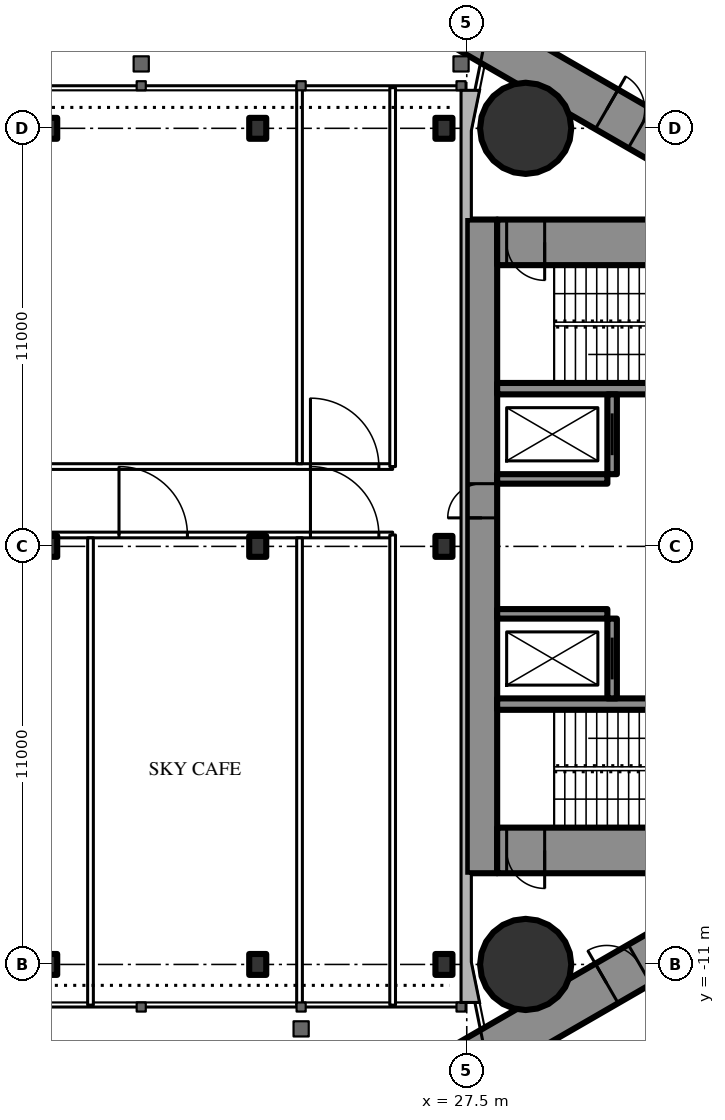
"""IFC4 building model, lengths in metres.
Left out: names, types, materials, properties, quantities, classifications, styles, units other than length and angle.
Written with IfcOpenShell. Run it as: python <this file> out.ifc"""

import sys

from ifc_helpers import new_model, si_unit, direction, frame, frame_2d, origin, origin_2d, place, context, subcontext, project, spatial, rectangle, circle, i_section, extrude, element, fill, save


model = new_model("IFC4")
c1 = context("Model", 3, precision=1e-05, world=origin(), true_north=direction((0.0, 1.0)))
c2 = subcontext(c1, "Body", "Model", "MODEL_VIEW")
j1 = project(units=[si_unit("LENGTHUNIT", "METRE"), si_unit("PLANEANGLEUNIT", "RADIAN")], contexts=[c1])
p1 = place(None, origin())
s1 = spatial("IfcSite", under=j1, at=p1, CompositionType="ELEMENT")
p2 = place(p1, origin())
s2 = spatial("IfcBuilding", under=s1, at=p2, CompositionType="ELEMENT")
p3 = place(p2, frame((0.0, 0.0, 257.3)))
s3 = spatial("IfcBuildingStorey", under=s2, at=p3, CompositionType="ELEMENT", Elevation=257.3)
for number, where, z_axis, x_axis in (
    (1, (29.05, 11.0, 0.0), (0.0, 0.0, 1.0), (1.0, 0.0, 0.0)),
    (2, (29.05, -11.0, 0.0), (0.0, 0.0, 1.0), (1.0, 0.0, 0.0)),
):
    element("IfcColumn", number, at=place(p3, frame(where, z_axis=z_axis, x_axis=x_axis)), inside=s3, PredefinedType="COLUMN", context=c2, shape_type="SweptSolid", body=[
        extrude(circle(Radius=1.2, at=origin_2d()), origin(), (0.0, 0.0, 1.0), 6.0),
    ])
p4 = place(p3, frame((27.9, -8.6, 0.0), z_axis=(0.0, 0.0, 1.0), x_axis=(0.0, 1.0, 0.0)))
e3 = element("IfcWall", 3, at=p4, inside=s3, PredefinedType="SHEAR", context=c2, shape_type="SweptSolid", body=[
    extrude(rectangle(XDim=17.2, YDim=0.8, at=frame_2d((8.6, 0.0))), origin(), (0.0, 0.0, 1.0), 6.0),
])
p5 = place(p4, frame((9.35, 0.0, 0.0)))
e4 = element("IfcOpeningElement", 4, at=p5, cuts=e3, PredefinedType="OPENING", context=c2, shape_type="SweptSolid", body=[
    extrude(rectangle(XDim=0.9, YDim=2.2, at=frame_2d((0.45, 1.1))), frame((0.0, 0.41, 0.0), z_axis=(0.0, -1.0, 0.0), x_axis=(1.0, 0.0, 0.0)), (0.0, 0.0, 1.0), 0.82),
])
p6 = place(p3, frame((28.3, -8.0, 0.0), z_axis=(0.0, 0.0, 1.0), x_axis=(1.0, 0.0, 0.0)))
e5 = element("IfcWall", 5, at=p6, inside=s3, PredefinedType="SHEAR", context=c2, shape_type="SweptSolid", body=[
    extrude(rectangle(XDim=8.4, YDim=1.2, at=frame_2d((4.2, 0.0))), origin(), (0.0, 0.0, 1.0), 6.0),
])
p7 = place(p6, frame((0.25, 0.0, 0.0)))
e6 = element("IfcOpeningElement", 6, at=p7, cuts=e5, PredefinedType="OPENING", context=c2, shape_type="SweptSolid", body=[
    extrude(rectangle(XDim=1.0, YDim=2.2, at=frame_2d((0.5, 1.1))), frame((0.0, 0.61, 0.0), z_axis=(0.0, -1.0, 0.0), x_axis=(1.0, 0.0, 0.0)), (0.0, 0.0, 1.0), 1.22),
])
p8 = place(p3, frame((28.3, 8.0, 0.0), z_axis=(0.0, 0.0, 1.0), x_axis=(1.0, 0.0, 0.0)))
e7 = element("IfcWall", 7, at=p8, inside=s3, PredefinedType="SHEAR", context=c2, shape_type="SweptSolid", body=[
    extrude(rectangle(XDim=8.4, YDim=1.2, at=frame_2d((4.2, 0.0))), origin(), (0.0, 0.0, 1.0), 6.0),
])
p9 = place(p8, frame((0.25, 0.0, 0.0)))
e8 = element("IfcOpeningElement", 8, at=p9, cuts=e7, PredefinedType="OPENING", context=c2, shape_type="SweptSolid", body=[
    extrude(rectangle(XDim=1.0, YDim=2.2, at=frame_2d((0.5, 1.1))), frame((0.0, 0.61, 0.0), z_axis=(0.0, -1.0, 0.0), x_axis=(1.0, 0.0, 0.0)), (0.0, 0.0, 1.0), 1.22),
])
for number, where, z_axis, x_axis in (
    (9, (28.3, -4.15, 0.0), (0.0, 0.0, 1.0), (1.0, 0.0, 0.0)),
    (10, (28.3, 4.15, 0.0), (0.0, 0.0, 1.0), (1.0, 0.0, 0.0)),
):
    element("IfcWall", number, at=place(p3, frame(where, z_axis=z_axis, x_axis=x_axis)), inside=s3, PredefinedType="SHEAR", context=c2, shape_type="SweptSolid", body=[
        extrude(rectangle(XDim=8.4, YDim=0.3, at=frame_2d((4.2, 0.0))), origin(), (0.0, 0.0, 1.0), 6.0),
    ])
p10 = place(p3, frame((31.325, -4.0, 0.0), z_axis=(0.0, 0.0, 1.0), x_axis=(0.0, 1.0, 0.0)))
e11 = element("IfcWall", 11, at=p10, inside=s3, PredefinedType="SHEAR", context=c2, shape_type="SweptSolid", body=[
    extrude(rectangle(XDim=2.1, YDim=0.25, at=frame_2d((1.05, 0.0))), origin(), (0.0, 0.0, 1.0), 6.0),
])
p11 = place(p10, frame((0.5, 0.0, 0.0)))
e12 = element("IfcOpeningElement", 12, at=p11, cuts=e11, PredefinedType="OPENING", context=c2, shape_type="SweptSolid", body=[
    extrude(rectangle(XDim=1.1, YDim=2.2, at=frame_2d((0.55, 1.1))), frame((0.0, 0.135, 0.0), z_axis=(0.0, -1.0, 0.0), x_axis=(1.0, 0.0, 0.0)), (0.0, 0.0, 1.0), 0.27),
])
p12 = place(p3, frame((28.3, -1.775, 0.0), z_axis=(0.0, 0.0, 1.0), x_axis=(1.0, 0.0, 0.0)))
e13 = element("IfcWall", 13, at=p12, inside=s3, PredefinedType="SHEAR", context=c2, shape_type="SweptSolid", body=[
    extrude(rectangle(XDim=2.9, YDim=0.25, at=frame_2d((1.45, 0.0))), origin(), (0.0, 0.0, 1.0), 6.0),
])
p13 = place(p3, frame((31.325, 1.9, 0.0), z_axis=(0.0, 0.0, 1.0), x_axis=(0.0, 1.0, 0.0)))
e14 = element("IfcWall", 14, at=p13, inside=s3, PredefinedType="SHEAR", context=c2, shape_type="SweptSolid", body=[
    extrude(rectangle(XDim=2.1, YDim=0.25, at=frame_2d((1.05, 0.0))), origin(), (0.0, 0.0, 1.0), 6.0),
])
p14 = place(p13, frame((0.5, 0.0, 0.0)))
e15 = element("IfcOpeningElement", 15, at=p14, cuts=e14, PredefinedType="OPENING", context=c2, shape_type="SweptSolid", body=[
    extrude(rectangle(XDim=1.1, YDim=2.2, at=frame_2d((0.55, 1.1))), frame((0.0, 0.135, 0.0), z_axis=(0.0, -1.0, 0.0), x_axis=(1.0, 0.0, 0.0)), (0.0, 0.0, 1.0), 0.27),
])
p15 = place(p3, frame((28.3, 1.775, 0.0), z_axis=(0.0, 0.0, 1.0), x_axis=(1.0, 0.0, 0.0)))
e16 = element("IfcWall", 16, at=p15, inside=s3, PredefinedType="SHEAR", context=c2, shape_type="SweptSolid", body=[
    extrude(rectangle(XDim=2.9, YDim=0.25, at=frame_2d((1.45, 0.0))), origin(), (0.0, 0.0, 1.0), 6.0),
])
p16 = place(p3, frame((27.2, -13.8, 0.0), z_axis=(0.0, 0.0, 1.0), x_axis=(0.866027159892, 0.499996958321, 0.0)))
e17 = element("IfcWall", 17, at=p16, inside=s3, PredefinedType="SHEAR", context=c2, shape_type="SweptSolid", body=[
    extrude(rectangle(XDim=27.947, YDim=1.2, at=frame_2d((13.973, 0.0))), origin(), (0.0, 0.0, 1.0), 6.0),
])
p17 = place(p16, frame((4.6, 0.0, 0.0)))
e18 = element("IfcOpeningElement", 18, at=p17, cuts=e17, PredefinedType="OPENING", context=c2, shape_type="SweptSolid", body=[
    extrude(rectangle(XDim=1.0, YDim=2.2, at=frame_2d((0.5, 1.1))), frame((0.0, 0.61, 0.0), z_axis=(0.0, -1.0, 0.0), x_axis=(1.0, 0.0, 0.0)), (0.0, 0.0, 1.0), 1.22),
])
p18 = place(p16, frame((13.395, 0.0, 0.0)))
e19 = element("IfcOpeningElement", 19, at=p18, cuts=e17, PredefinedType="OPENING", context=c2, shape_type="SweptSolid", body=[
    extrude(rectangle(XDim=1.8, YDim=2.2, at=frame_2d((0.9, 1.1))), frame((0.0, 0.61, 0.0), z_axis=(0.0, -1.0, 0.0), x_axis=(1.0, 0.0, 0.0)), (0.0, 0.0, 1.0), 1.22),
])
p19 = place(p3, frame((27.2, 13.8, 0.0), z_axis=(0.0, 0.0, 1.0), x_axis=(0.866024515034, -0.500001539357, 0.0)))
e20 = element("IfcWall", 20, at=p19, inside=s3, PredefinedType="SHEAR", context=c2, shape_type="SweptSolid", body=[
    extrude(rectangle(XDim=26.907, YDim=1.2, at=frame_2d((13.454, 0.0))), origin(), (0.0, 0.0, 1.0), 6.0),
])
p20 = place(p19, frame((4.6, 0.0, 0.0)))
e21 = element("IfcOpeningElement", 21, at=p20, cuts=e20, PredefinedType="OPENING", context=c2, shape_type="SweptSolid", body=[
    extrude(rectangle(XDim=1.0, YDim=2.2, at=frame_2d((0.5, 1.1))), frame((0.0, 0.61, 0.0), z_axis=(0.0, -1.0, 0.0), x_axis=(1.0, 0.0, 0.0)), (0.0, 0.0, 1.0), 1.22),
])
p21 = place(p19, frame((13.395, 0.0, 0.0)))
e22 = element("IfcOpeningElement", 22, at=p21, cuts=e20, PredefinedType="OPENING", context=c2, shape_type="SweptSolid", body=[
    extrude(rectangle(XDim=1.8, YDim=2.2, at=frame_2d((0.9, 1.1))), frame((0.0, 0.61, 0.0), z_axis=(0.0, -1.0, 0.0), x_axis=(1.0, 0.0, 0.0)), (0.0, 0.0, 1.0), 1.22),
])
for number, where, z_axis, x_axis in (
    (23, (16.5, -11.0, 0.0), (0.0, 0.0, 1.0), (1.0, 0.0, 0.0)),
    (24, (22.0, -11.0, 0.0), (0.0, 0.0, 1.0), (1.0, 0.0, 0.0)),
    (25, (26.9, -11.0, 0.0), (0.0, 0.0, 1.0), (1.0, 0.0, 0.0)),
    (26, (16.5, 0.0, 0.0), (0.0, 0.0, 1.0), (1.0, 0.0, 0.0)),
    (27, (22.0, 0.0, 0.0), (0.0, 0.0, 1.0), (1.0, 0.0, 0.0)),
    (28, (26.9, 0.0, 0.0), (0.0, 0.0, 1.0), (1.0, 0.0, 0.0)),
    (29, (16.5, 11.0, 0.0), (0.0, 0.0, 1.0), (1.0, 0.0, 0.0)),
    (30, (22.0, 11.0, 0.0), (0.0, 0.0, 1.0), (1.0, 0.0, 0.0)),
    (31, (26.9, 11.0, 0.0), (0.0, 0.0, 1.0), (1.0, 0.0, 0.0)),
):
    element("IfcColumn", number, at=place(p3, frame(where, z_axis=z_axis, x_axis=x_axis)), inside=s3, PredefinedType="COLUMN", context=c2, shape_type="SweptSolid", body=[
        extrude(i_section(OverallWidth=0.448, OverallDepth=0.55, WebThickness=0.072, FlangeThickness=0.115, FilletRadius=0.02, at=origin_2d()), origin(), (0.0, 0.0, 1.0), 6.0),
    ])
p22 = place(p3, frame((28.907, -15.47, 0.0), z_axis=(0.0, 0.0, 1.0), x_axis=(0.866023700353, 0.500002950419, 0.0)))
e32 = element("IfcWall", 32, at=p22, inside=s3, PredefinedType="PARTITIONING", context=c2, shape_type="SweptSolid", body=[
    extrude(rectangle(XDim=30.941, YDim=0.2, at=frame_2d((15.47, 0.0))), origin(), (0.0, 0.0, 1.0), 5.75),
])
p23 = place(p22, frame((7.024, 0.0, 0.0)))
e33 = element("IfcOpeningElement", 33, at=p23, cuts=e32, PredefinedType="OPENING", context=c2, shape_type="SweptSolid", body=[
    extrude(rectangle(XDim=2.0, YDim=2.4, at=frame_2d((1.0, 1.2))), frame((0.0, 0.11, 0.0), z_axis=(0.0, -1.0, 0.0), x_axis=(1.0, 0.0, 0.0)), (0.0, 0.0, 1.0), 0.22),
])
p24 = place(p22, frame((16.865, 0.0, 0.0)))
e34 = element("IfcOpeningElement", 34, at=p24, cuts=e32, PredefinedType="OPENING", context=c2, shape_type="SweptSolid", body=[
    extrude(rectangle(XDim=1.8, YDim=2.2, at=frame_2d((0.9, 1.1))), frame((0.0, 0.11, 0.0), z_axis=(0.0, -1.0, 0.0), x_axis=(1.0, 0.0, 0.0)), (0.0, 0.0, 1.0), 0.22),
])
p25 = place(p22, frame((20.748, 0.0, 0.0)))
e35 = element("IfcOpeningElement", 35, at=p25, cuts=e32, PredefinedType="OPENING", context=c2, shape_type="SweptSolid", body=[
    extrude(rectangle(XDim=1.8, YDim=2.2, at=frame_2d((0.9, 1.1))), frame((0.0, 0.11, 0.0), z_axis=(0.0, -1.0, 0.0), x_axis=(1.0, 0.0, 0.0)), (0.0, 0.0, 1.0), 0.22),
])
p26 = place(p22, frame((26.152, 0.0, 0.0)))
e36 = element("IfcOpeningElement", 36, at=p26, cuts=e32, PredefinedType="OPENING", context=c2, shape_type="SweptSolid", body=[
    extrude(rectangle(XDim=2.0, YDim=2.4, at=frame_2d((1.0, 1.2))), frame((0.0, 0.11, 0.0), z_axis=(0.0, -1.0, 0.0), x_axis=(1.0, 0.0, 0.0)), (0.0, 0.0, 1.0), 0.22),
])
p27 = place(p3, frame((28.907, 15.47, 0.0), z_axis=(0.0, 0.0, 1.0), x_axis=(0.866025841386, -0.499999242051, 0.0)))
e37 = element("IfcWall", 37, at=p27, inside=s3, PredefinedType="PARTITIONING", context=c2, shape_type="SweptSolid", body=[
    extrude(rectangle(XDim=30.821, YDim=0.2, at=frame_2d((15.41, 0.0))), origin(), (0.0, 0.0, 1.0), 5.75),
])
p28 = place(p27, frame((26.092, 0.0, 0.0)))
e38 = element("IfcOpeningElement", 38, at=p28, cuts=e37, PredefinedType="OPENING", context=c2, shape_type="SweptSolid", body=[
    extrude(rectangle(XDim=2.0, YDim=2.4, at=frame_2d((1.0, 1.2))), frame((0.0, 0.11, 0.0), z_axis=(0.0, -1.0, 0.0), x_axis=(1.0, 0.0, 0.0)), (0.0, 0.0, 1.0), 0.22),
])
p29 = place(p27, frame((20.748, 0.0, 0.0)))
e39 = element("IfcOpeningElement", 39, at=p29, cuts=e37, PredefinedType="OPENING", context=c2, shape_type="SweptSolid", body=[
    extrude(rectangle(XDim=1.8, YDim=2.2, at=frame_2d((0.9, 1.1))), frame((0.0, 0.11, 0.0), z_axis=(0.0, -1.0, 0.0), x_axis=(1.0, 0.0, 0.0)), (0.0, 0.0, 1.0), 0.22),
])
p30 = place(p27, frame((16.865, 0.0, 0.0)))
e40 = element("IfcOpeningElement", 40, at=p30, cuts=e37, PredefinedType="OPENING", context=c2, shape_type="SweptSolid", body=[
    extrude(rectangle(XDim=1.8, YDim=2.2, at=frame_2d((0.9, 1.1))), frame((0.0, 0.11, 0.0), z_axis=(0.0, -1.0, 0.0), x_axis=(1.0, 0.0, 0.0)), (0.0, 0.0, 1.0), 0.22),
])
p31 = place(p27, frame((7.024, 0.0, 0.0)))
e41 = element("IfcOpeningElement", 41, at=p31, cuts=e37, PredefinedType="OPENING", context=c2, shape_type="SweptSolid", body=[
    extrude(rectangle(XDim=2.0, YDim=2.4, at=frame_2d((1.0, 1.2))), frame((0.0, 0.11, 0.0), z_axis=(0.0, -1.0, 0.0), x_axis=(1.0, 0.0, 0.0)), (0.0, 0.0, 1.0), 0.22),
])
p32 = place(p3, frame((-25.55, 0.3, 0.0), z_axis=(0.0, 0.0, 1.0), x_axis=(1.0, 0.0, 0.0)))
e42 = element("IfcWall", 42, at=p32, inside=s3, PredefinedType="PARTITIONING", context=c2, shape_type="SweptSolid", body=[
    extrude(rectangle(XDim=51.1, YDim=0.15, at=frame_2d((25.55, 0.0))), origin(), (0.0, 0.0, 1.0), 4.8),
])
p33 = place(p32, frame((0.363, 0.0, 0.0)))
e43 = element("IfcOpeningElement", 43, at=p33, cuts=e42, PredefinedType="OPENING", context=c2, shape_type="SweptSolid", body=[
    extrude(rectangle(XDim=1.8, YDim=2.2, at=frame_2d((0.9, 1.1))), frame((0.0, 0.085, 0.0), z_axis=(0.0, -1.0, 0.0), x_axis=(1.0, 0.0, 0.0)), (0.0, 0.0, 1.0), 0.17),
])
p34 = place(p32, frame((5.4, 0.0, 0.0)))
e44 = element("IfcOpeningElement", 44, at=p34, cuts=e42, PredefinedType="OPENING", context=c2, shape_type="SweptSolid", body=[
    extrude(rectangle(XDim=1.8, YDim=2.2, at=frame_2d((0.9, 1.1))), frame((0.0, 0.085, 0.0), z_axis=(0.0, -1.0, 0.0), x_axis=(1.0, 0.0, 0.0)), (0.0, 0.0, 1.0), 0.17),
])
p35 = place(p32, frame((21.8, 0.0, 0.0)))
e45 = element("IfcOpeningElement", 45, at=p35, cuts=e42, PredefinedType="OPENING", context=c2, shape_type="SweptSolid", body=[
    extrude(rectangle(XDim=2.0, YDim=2.4, at=frame_2d((1.0, 1.2))), frame((0.0, 0.085, 0.0), z_axis=(0.0, -1.0, 0.0), x_axis=(1.0, 0.0, 0.0)), (0.0, 0.0, 1.0), 0.17),
])
p36 = place(p32, frame((43.9, 0.0, 0.0)))
e46 = element("IfcOpeningElement", 46, at=p36, cuts=e42, PredefinedType="OPENING", context=c2, shape_type="SweptSolid", body=[
    extrude(rectangle(XDim=1.8, YDim=2.2, at=frame_2d((0.9, 1.1))), frame((0.0, 0.085, 0.0), z_axis=(0.0, -1.0, 0.0), x_axis=(1.0, 0.0, 0.0)), (0.0, 0.0, 1.0), 0.17),
])
p37 = place(p32, frame((48.938, 0.0, 0.0)))
e47 = element("IfcOpeningElement", 47, at=p37, cuts=e42, PredefinedType="OPENING", context=c2, shape_type="SweptSolid", body=[
    extrude(rectangle(XDim=1.8, YDim=2.2, at=frame_2d((0.9, 1.1))), frame((0.0, 0.085, 0.0), z_axis=(0.0, -1.0, 0.0), x_axis=(1.0, 0.0, 0.0)), (0.0, 0.0, 1.0), 0.17),
])
p38 = place(p3, frame((-25.55, 2.1, 0.0), z_axis=(0.0, 0.0, 1.0), x_axis=(1.0, 0.0, 0.0)))
e48 = element("IfcWall", 48, at=p38, inside=s3, PredefinedType="PARTITIONING", context=c2, shape_type="SweptSolid", body=[
    extrude(rectangle(XDim=51.1, YDim=0.15, at=frame_2d((25.55, 0.0))), origin(), (0.0, 0.0, 1.0), 5.8),
])
p39 = place(p38, frame((0.363, 0.0, 0.0)))
e49 = element("IfcOpeningElement", 49, at=p39, cuts=e48, PredefinedType="OPENING", context=c2, shape_type="SweptSolid", body=[
    extrude(rectangle(XDim=1.8, YDim=2.2, at=frame_2d((0.9, 1.1))), frame((0.0, 0.085, 0.0), z_axis=(0.0, -1.0, 0.0), x_axis=(1.0, 0.0, 0.0)), (0.0, 0.0, 1.0), 0.17),
])
p40 = place(p38, frame((10.9, 0.0, 0.0)))
e50 = element("IfcOpeningElement", 50, at=p40, cuts=e48, PredefinedType="OPENING", context=c2, shape_type="SweptSolid", body=[
    extrude(rectangle(XDim=1.8, YDim=2.2, at=frame_2d((0.9, 1.1))), frame((0.0, 0.085, 0.0), z_axis=(0.0, -1.0, 0.0), x_axis=(1.0, 0.0, 0.0)), (0.0, 0.0, 1.0), 0.17),
])
p41 = place(p38, frame((38.3, 0.0, 0.0)))
e51 = element("IfcOpeningElement", 51, at=p41, cuts=e48, PredefinedType="OPENING", context=c2, shape_type="SweptSolid", body=[
    extrude(rectangle(XDim=2.0, YDim=2.4, at=frame_2d((1.0, 1.2))), frame((0.0, 0.085, 0.0), z_axis=(0.0, -1.0, 0.0), x_axis=(1.0, 0.0, 0.0)), (0.0, 0.0, 1.0), 0.17),
])
p42 = place(p38, frame((48.938, 0.0, 0.0)))
e52 = element("IfcOpeningElement", 52, at=p42, cuts=e48, PredefinedType="OPENING", context=c2, shape_type="SweptSolid", body=[
    extrude(rectangle(XDim=1.8, YDim=2.2, at=frame_2d((0.9, 1.1))), frame((0.0, 0.085, 0.0), z_axis=(0.0, -1.0, 0.0), x_axis=(1.0, 0.0, 0.0)), (0.0, 0.0, 1.0), 0.17),
])
p43 = place(p3, frame((25.55, -12.07, 0.0), z_axis=(0.0, 0.0, 1.0), x_axis=(0.0, 1.0, 0.0)))
e53 = element("IfcWall", 53, at=p43, inside=s3, PredefinedType="PARTITIONING", context=c2, shape_type="SweptSolid", body=[
    extrude(rectangle(XDim=12.37, YDim=0.15, at=frame_2d((6.185, 0.0))), origin(), (0.0, 0.0, 1.0), 5.8),
])
p44 = place(p3, frame((25.55, 2.1, 0.0), z_axis=(0.0, 0.0, 1.0), x_axis=(0.0, 1.0, 0.0)))
e54 = element("IfcWall", 54, at=p44, inside=s3, PredefinedType="PARTITIONING", context=c2, shape_type="SweptSolid", body=[
    extrude(rectangle(XDim=9.97, YDim=0.15, at=frame_2d((4.985, 0.0))), origin(), (0.0, 0.0, 1.0), 5.8),
])
for number, where, z_axis, x_axis in (
    (55, (17.6, -12.07, 0.0), (0.0, 0.0, 1.0), (0.0, 1.0, 0.0)),
    (56, (23.1, -12.07, 0.0), (0.0, 0.0, 1.0), (0.0, 1.0, 0.0)),
):
    element("IfcWall", number, at=place(p3, frame(where, z_axis=z_axis, x_axis=x_axis)), inside=s3, PredefinedType="PARTITIONING", context=c2, shape_type="SweptSolid", body=[
        extrude(rectangle(XDim=12.295, YDim=0.15, at=frame_2d((6.147, 0.0))), origin(), (0.0, 0.0, 1.0), 5.8),
    ])
p45 = place(p3, frame((23.1, 2.175, 0.0), z_axis=(0.0, 0.0, 1.0), x_axis=(0.0, 1.0, 0.0)))
e57 = element("IfcWall", 57, at=p45, inside=s3, PredefinedType="PARTITIONING", context=c2, shape_type="SweptSolid", body=[
    extrude(rectangle(XDim=9.895, YDim=0.15, at=frame_2d((4.948, 0.0))), origin(), (0.0, 0.0, 1.0), 5.8),
])
p46 = place(p17, origin())
e58 = element("IfcDoor", 58, at=p46, inside=s3, OperationType="SINGLE_SWING_LEFT", PredefinedType="DOOR", context=c2, shape_type="SweptSolid", body=[
    extrude(rectangle(XDim=1.0, YDim=2.2, at=frame_2d((0.5, 1.1))), frame((0.0, 0.025, 0.0), z_axis=(0.0, -1.0, 0.0), x_axis=(1.0, 0.0, 0.0)), (0.0, 0.0, 1.0), 0.05),
])
fill(e18, e58)
p47 = place(p20, origin())
e59 = element("IfcDoor", 59, at=p47, inside=s3, OperationType="SINGLE_SWING_LEFT", PredefinedType="DOOR", context=c2, shape_type="SweptSolid", body=[
    extrude(rectangle(XDim=1.0, YDim=2.2, at=frame_2d((0.5, 1.1))), frame((0.0, 0.025, 0.0), z_axis=(0.0, -1.0, 0.0), x_axis=(1.0, 0.0, 0.0)), (0.0, 0.0, 1.0), 0.05),
])
fill(e21, e59)
p48 = place(p7, origin())
e60 = element("IfcDoor", 60, at=p48, inside=s3, OperationType="SINGLE_SWING_RIGHT", PredefinedType="DOOR", context=c2, shape_type="SweptSolid", body=[
    extrude(rectangle(XDim=1.0, YDim=2.2, at=frame_2d((0.5, 1.1))), frame((0.0, 0.025, 0.0), z_axis=(0.0, -1.0, 0.0), x_axis=(1.0, 0.0, 0.0)), (0.0, 0.0, 1.0), 0.05),
])
fill(e6, e60)
p49 = place(p9, origin())
e61 = element("IfcDoor", 61, at=p49, inside=s3, OperationType="SINGLE_SWING_RIGHT", PredefinedType="DOOR", context=c2, shape_type="SweptSolid", body=[
    extrude(rectangle(XDim=1.0, YDim=2.2, at=frame_2d((0.5, 1.1))), frame((0.0, 0.025, 0.0), z_axis=(0.0, -1.0, 0.0), x_axis=(1.0, 0.0, 0.0)), (0.0, 0.0, 1.0), 0.05),
])
fill(e8, e61)
p50 = place(p5, origin())
e62 = element("IfcDoor", 62, at=p50, inside=s3, OperationType="SINGLE_SWING_LEFT", PredefinedType="DOOR", context=c2, shape_type="SweptSolid", body=[
    extrude(rectangle(XDim=0.9, YDim=2.2, at=frame_2d((0.45, 1.1))), frame((0.0, 0.025, 0.0), z_axis=(0.0, -1.0, 0.0), x_axis=(1.0, 0.0, 0.0)), (0.0, 0.0, 1.0), 0.05),
])
fill(e4, e62)
p51 = place(p36, origin())
e63 = element("IfcDoor", 63, at=p51, inside=s3, OperationType="DOUBLE_DOOR_SINGLE_SWING", PredefinedType="DOOR", context=c2, shape_type="SweptSolid", body=[
    extrude(rectangle(XDim=1.8, YDim=2.2, at=frame_2d((0.9, 1.1))), frame((0.0, 0.025, 0.0), z_axis=(0.0, -1.0, 0.0), x_axis=(1.0, 0.0, 0.0)), (0.0, 0.0, 1.0), 0.05),
])
fill(e46, e63)
p52 = place(p37, origin())
e64 = element("IfcDoor", 64, at=p52, inside=s3, OperationType="DOUBLE_DOOR_SINGLE_SWING", PredefinedType="DOOR", context=c2, shape_type="SweptSolid", body=[
    extrude(rectangle(XDim=1.8, YDim=2.2, at=frame_2d((0.9, 1.1))), frame((0.0, 0.025, 0.0), z_axis=(0.0, -1.0, 0.0), x_axis=(1.0, 0.0, 0.0)), (0.0, 0.0, 1.0), 0.05),
])
fill(e47, e64)
p53 = place(p42, origin())
e65 = element("IfcDoor", 65, at=p53, inside=s3, OperationType="DOUBLE_DOOR_SINGLE_SWING", PredefinedType="DOOR", context=c2, shape_type="SweptSolid", body=[
    extrude(rectangle(XDim=1.8, YDim=2.2, at=frame_2d((0.9, 1.1))), frame((0.0, 0.025, 0.0), z_axis=(0.0, -1.0, 0.0), x_axis=(1.0, 0.0, 0.0)), (0.0, 0.0, 1.0), 0.05),
])
fill(e52, e65)
p54 = place(p11, origin())
e66 = element("IfcDoor", 66, at=p54, inside=s3, OperationType="SLIDING_TO_LEFT", PredefinedType="USERDEFINED", context=c2, shape_type="SweptSolid", body=[
    extrude(rectangle(XDim=1.1, YDim=2.2, at=frame_2d((0.55, 1.1))), frame((0.0, 0.025, 0.0), z_axis=(0.0, -1.0, 0.0), x_axis=(1.0, 0.0, 0.0)), (0.0, 0.0, 1.0), 0.05),
])
fill(e12, e66)
p55 = place(p14, origin())
e67 = element("IfcDoor", 67, at=p55, inside=s3, OperationType="SLIDING_TO_LEFT", PredefinedType="USERDEFINED", context=c2, shape_type="SweptSolid", body=[
    extrude(rectangle(XDim=1.1, YDim=2.2, at=frame_2d((0.55, 1.1))), frame((0.0, 0.025, 0.0), z_axis=(0.0, -1.0, 0.0), x_axis=(1.0, 0.0, 0.0)), (0.0, 0.0, 1.0), 0.05),
])
fill(e15, e67)
save(model, sys.argv[1])
